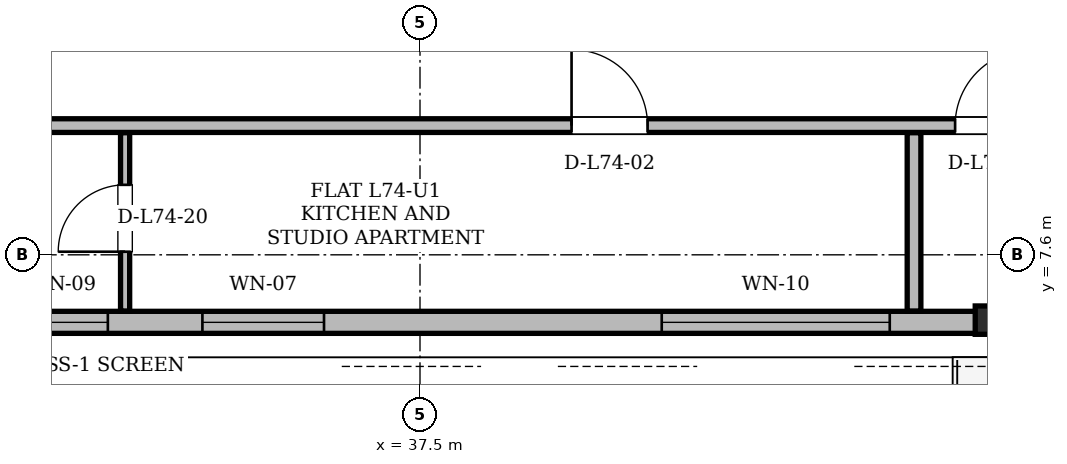
"""IFC4 building model, lengths in metres.
Left out: names, types, materials, properties, quantities, classifications, styles, units other than length and angle.
Written with IfcOpenShell. Run it as: python <this file> out.ifc"""

import sys

from ifc_helpers import new_model, si_unit, direction, frame, frame_2d, origin, origin_2d, place, context, subcontext, project, spatial, rectangle, i_section, extrude, element, fill, save


model = new_model("IFC4")
c1 = context("Model", 3, precision=1e-05, world=origin(), true_north=direction((0.0, 1.0)))
c2 = subcontext(c1, "Body", "Model", "MODEL_VIEW")
j1 = project(units=[si_unit("LENGTHUNIT", "METRE"), si_unit("PLANEANGLEUNIT", "RADIAN")], contexts=[c1])
p1 = place(None, origin())
s1 = spatial("IfcSite", under=j1, at=p1, CompositionType="ELEMENT")
p2 = place(p1, origin())
s2 = spatial("IfcBuilding", under=s1, at=p2, CompositionType="ELEMENT")
p3 = place(p2, frame((0.0, 0.0, 281.1)))
s3 = spatial("IfcBuildingStorey", under=s2, at=p3, CompositionType="ELEMENT", Elevation=281.1)
p4 = place(p3, frame((44.987, 6.712, 0.004), z_axis=(0.00232123075, 0.014931159961, 0.999885829658), x_axis=(-0.988130477704, 0.153616923004, 0.0)))
e1 = element("IfcColumn", 1, at=p4, inside=s3, PredefinedType="COLUMN", context=c2, shape_type="SweptSolid", body=[
    extrude(i_section(OverallWidth=0.373, OverallDepth=0.373, WebThickness=0.016, FlangeThickness=0.026, at=origin_2d()), origin(), (0.0, 0.0, 1.0), 3.892),
])
p5 = place(p3, frame((18.782, 6.712, 0.0), z_axis=(0.0, 0.0, 1.0), x_axis=(1.0, 0.0, 0.0)))
e2 = element("IfcWall", 2, at=p5, inside=s3, PredefinedType="SOLIDWALL", context=c2, shape_type="SweptSolid", body=[
    extrude(rectangle(XDim=37.436, YDim=0.29, at=frame_2d((18.718, 0.0))), origin(), (0.0, 0.0, 1.0), 3.058),
])
p6 = place(p5, frame((3.639, 0.0, 0.0)))
e3 = element("IfcOpeningElement", 3, at=p6, cuts=e2, PredefinedType="OPENING", context=c2, shape_type="SweptSolid", body=[
    extrude(rectangle(XDim=1.5, YDim=2.2, at=frame_2d((0.75, 1.1))), frame((0.0, 0.145, 0.0), z_axis=(0.0, -1.0, 0.0), x_axis=(1.0, 0.0, 0.0)), (0.0, 0.0, 1.0), 0.29),
])
p7 = place(p5, frame((27.901, 0.0, 0.0)))
e4 = element("IfcOpeningElement", 4, at=p7, cuts=e2, PredefinedType="OPENING", context=c2, shape_type="SweptSolid", body=[
    extrude(rectangle(XDim=1.5, YDim=2.2, at=frame_2d((0.75, 1.1))), frame((0.0, 0.145, 0.0), z_axis=(0.0, -1.0, 0.0), x_axis=(1.0, 0.0, 0.0)), (0.0, 0.0, 1.0), 0.29),
])
p8 = place(p5, frame((15.855, 0.0, 0.85)))
e5 = element("IfcOpeningElement", 5, at=p8, cuts=e2, PredefinedType="OPENING", context=c2, shape_type="SweptSolid", body=[
    extrude(rectangle(XDim=1.6, YDim=1.7, at=frame_2d((0.8, 0.85))), frame((0.0, 0.145, 0.0), z_axis=(0.0, -1.0, 0.0), x_axis=(1.0, 0.0, 0.0)), (0.0, 0.0, 1.0), 0.29),
])
p9 = place(p5, frame((21.898, 0.0, 0.85)))
e6 = element("IfcOpeningElement", 6, at=p9, cuts=e2, PredefinedType="OPENING", context=c2, shape_type="SweptSolid", body=[
    extrude(rectangle(XDim=3.0, YDim=2.098, at=frame_2d((1.5, 1.049))), frame((0.0, 0.145, 0.0), z_axis=(0.0, -1.0, 0.0), x_axis=(1.0, 0.0, 0.0)), (0.0, 0.0, 1.0), 0.29),
])
p10 = place(p5, frame((13.411, 0.0, 0.85)))
e7 = element("IfcOpeningElement", 7, at=p10, cuts=e2, PredefinedType="OPENING", context=c2, shape_type="SweptSolid", body=[
    extrude(rectangle(XDim=1.2, YDim=1.48, at=frame_2d((0.6, 0.74))), frame((0.0, 0.145, 0.0), z_axis=(0.0, -1.0, 0.0), x_axis=(1.0, 0.0, 0.0)), (0.0, 0.0, 1.0), 0.29),
])
p11 = place(p5, frame((32.305, 0.0, 0.85)))
e8 = element("IfcOpeningElement", 8, at=p11, cuts=e2, PredefinedType="OPENING", context=c2, shape_type="SweptSolid", body=[
    extrude(rectangle(XDim=2.8, YDim=2.05, at=frame_2d((1.4, 1.025))), frame((0.0, 0.145, 0.0), z_axis=(0.0, -1.0, 0.0), x_axis=(1.0, 0.0, 0.0)), (0.0, 0.0, 1.0), 0.29),
])
p12 = place(p5, frame((1.34, 0.0, 0.85)))
e9 = element("IfcOpeningElement", 9, at=p12, cuts=e2, PredefinedType="OPENING", context=c2, shape_type="SweptSolid", body=[
    extrude(rectangle(XDim=1.2, YDim=1.48, at=frame_2d((0.6, 0.74))), frame((0.0, 0.145, 0.0), z_axis=(0.0, -1.0, 0.0), x_axis=(1.0, 0.0, 0.0)), (0.0, 0.0, 1.0), 0.29),
])
p13 = place(p5, frame((8.225, 0.0, 0.85)))
e10 = element("IfcOpeningElement", 10, at=p13, cuts=e2, PredefinedType="OPENING", context=c2, shape_type="SweptSolid", body=[
    extrude(rectangle(XDim=2.2, YDim=1.85, at=frame_2d((1.1, 0.925))), frame((0.0, 0.145, 0.0), z_axis=(0.0, -1.0, 0.0), x_axis=(1.0, 0.0, 0.0)), (0.0, 0.0, 1.0), 0.29),
])
p14 = place(p3, frame((25.6, 9.3, 0.0), z_axis=(0.0, 0.0, 1.0), x_axis=(1.0, 0.0, 0.0)))
e11 = element("IfcWall", 11, at=p14, inside=s3, PredefinedType="PARTITIONING", context=c2, shape_type="SweptSolid", body=[
    extrude(rectangle(XDim=21.85, YDim=0.18, at=frame_2d((10.925, 0.0))), origin(), (0.0, 0.0, 1.0), 3.68),
])
p15 = place(p14, frame((2.16, 0.0, 0.0)))
e12 = element("IfcOpeningElement", 12, at=p15, cuts=e11, PredefinedType="OPENING", context=c2, shape_type="SweptSolid", body=[
    extrude(rectangle(XDim=1.0, YDim=2.18, at=frame_2d((0.5, 1.09))), frame((0.0, 0.09, 0.0), z_axis=(0.0, -1.0, 0.0), x_axis=(1.0, 0.0, 0.0)), (0.0, 0.0, 1.0), 0.18),
])
p16 = place(p14, frame((13.894, 0.0, 0.0)))
e13 = element("IfcOpeningElement", 13, at=p16, cuts=e11, PredefinedType="OPENING", context=c2, shape_type="SweptSolid", body=[
    extrude(rectangle(XDim=1.0, YDim=2.18, at=frame_2d((0.5, 1.09))), frame((0.0, 0.09, 0.0), z_axis=(0.0, -1.0, 0.0), x_axis=(1.0, 0.0, 0.0)), (0.0, 0.0, 1.0), 0.18),
])
p17 = place(p14, frame((18.94, 0.0, 0.0)))
e14 = element("IfcOpeningElement", 14, at=p17, cuts=e11, PredefinedType="OPENING", context=c2, shape_type="SweptSolid", body=[
    extrude(rectangle(XDim=1.0, YDim=2.18, at=frame_2d((0.5, 1.09))), frame((0.0, 0.09, 0.0), z_axis=(0.0, -1.0, 0.0), x_axis=(1.0, 0.0, 0.0)), (0.0, 0.0, 1.0), 0.18),
])
p18 = place(p3, frame((33.62, 6.861, 0.0), z_axis=(0.0, 0.0, 1.0), x_axis=(0.0, 1.0, 0.0)))
e15 = element("IfcWall", 15, at=p18, inside=s3, PredefinedType="PARTITIONING", context=c2, shape_type="SweptSolid", body=[
    extrude(rectangle(XDim=2.345, YDim=0.12, at=frame_2d((1.173, 0.0))), origin(), (0.0, 0.0, 1.0), 3.68),
])
p19 = place(p18, frame((0.78, 0.0, 0.0)))
e16 = element("IfcOpeningElement", 16, at=p19, cuts=e15, PredefinedType="OPENING", context=c2, shape_type="SweptSolid", body=[
    extrude(rectangle(XDim=0.88, YDim=2.08, at=frame_2d((0.44, 1.04))), frame((0.0, 0.06, 0.0), z_axis=(0.0, -1.0, 0.0), x_axis=(1.0, 0.0, 0.0)), (0.0, 0.0, 1.0), 0.12),
])
p20 = place(p3, frame((44.0, 6.861, 0.0), z_axis=(0.0, 0.0, 1.0), x_axis=(0.0, 1.0, 0.0)))
e17 = element("IfcWall", 17, at=p20, inside=s3, PredefinedType="PARTITIONING", context=c2, shape_type="SweptSolid", body=[
    extrude(rectangle(XDim=2.345, YDim=0.18, at=frame_2d((1.173, 0.0))), origin(), (0.0, 0.0, 1.0), 3.68),
])
p21 = place(p8, origin())
e18 = element("IfcWindow", 18, at=p21, inside=s3, PartitioningType="SINGLE_PANEL", PredefinedType="WINDOW", context=c2, shape_type="SweptSolid", body=[
    extrude(rectangle(XDim=1.6, YDim=1.7, at=frame_2d((0.8, 0.85))), frame((0.0, 0.03, 0.0), z_axis=(0.0, -1.0, 0.0), x_axis=(1.0, 0.0, 0.0)), (0.0, 0.0, 1.0), 0.06),
])
fill(e5, e18)
p22 = place(p9, origin())
e19 = element("IfcWindow", 19, at=p22, inside=s3, PartitioningType="SINGLE_PANEL", PredefinedType="WINDOW", context=c2, shape_type="SweptSolid", body=[
    extrude(rectangle(XDim=3.0, YDim=2.098, at=frame_2d((1.5, 1.049))), frame((0.0, 0.03, 0.0), z_axis=(0.0, -1.0, 0.0), x_axis=(1.0, 0.0, 0.0)), (0.0, 0.0, 1.0), 0.06),
])
fill(e6, e19)
p23 = place(p10, origin())
e20 = element("IfcWindow", 20, at=p23, inside=s3, PartitioningType="SINGLE_PANEL", PredefinedType="WINDOW", context=c2, shape_type="SweptSolid", body=[
    extrude(rectangle(XDim=1.2, YDim=1.48, at=frame_2d((0.6, 0.74))), frame((0.0, 0.03, 0.0), z_axis=(0.0, -1.0, 0.0), x_axis=(1.0, 0.0, 0.0)), (0.0, 0.0, 1.0), 0.06),
])
fill(e7, e20)
p24 = place(p16, origin())
e21 = element("IfcDoor", 21, at=p24, inside=s3, OperationType="SINGLE_SWING_LEFT", PredefinedType="DOOR", context=c2, shape_type="SweptSolid", body=[
    extrude(rectangle(XDim=1.0, YDim=2.18, at=frame_2d((0.5, 1.09))), frame((0.0, 0.025, 0.0), z_axis=(0.0, -1.0, 0.0), x_axis=(1.0, 0.0, 0.0)), (0.0, 0.0, 1.0), 0.05),
])
fill(e13, e21)
p25 = place(p17, origin())
e22 = element("IfcDoor", 22, at=p25, inside=s3, OperationType="SINGLE_SWING_RIGHT", PredefinedType="DOOR", context=c2, shape_type="SweptSolid", body=[
    extrude(rectangle(XDim=1.0, YDim=2.18, at=frame_2d((0.5, 1.09))), frame((0.0, 0.025, 0.0), z_axis=(0.0, -1.0, 0.0), x_axis=(1.0, 0.0, 0.0)), (0.0, 0.0, 1.0), 0.05),
])
fill(e14, e22)
p26 = place(p19, origin())
e23 = element("IfcDoor", 23, at=p26, inside=s3, OperationType="SINGLE_SWING_LEFT", PredefinedType="DOOR", context=c2, shape_type="SweptSolid", body=[
    extrude(rectangle(XDim=0.88, YDim=2.08, at=frame_2d((0.44, 1.04))), frame((0.0, 0.025, 0.0), z_axis=(0.0, -1.0, 0.0), x_axis=(1.0, 0.0, 0.0)), (0.0, 0.0, 1.0), 0.05),
])
fill(e16, e23)
save(model, sys.argv[1])
